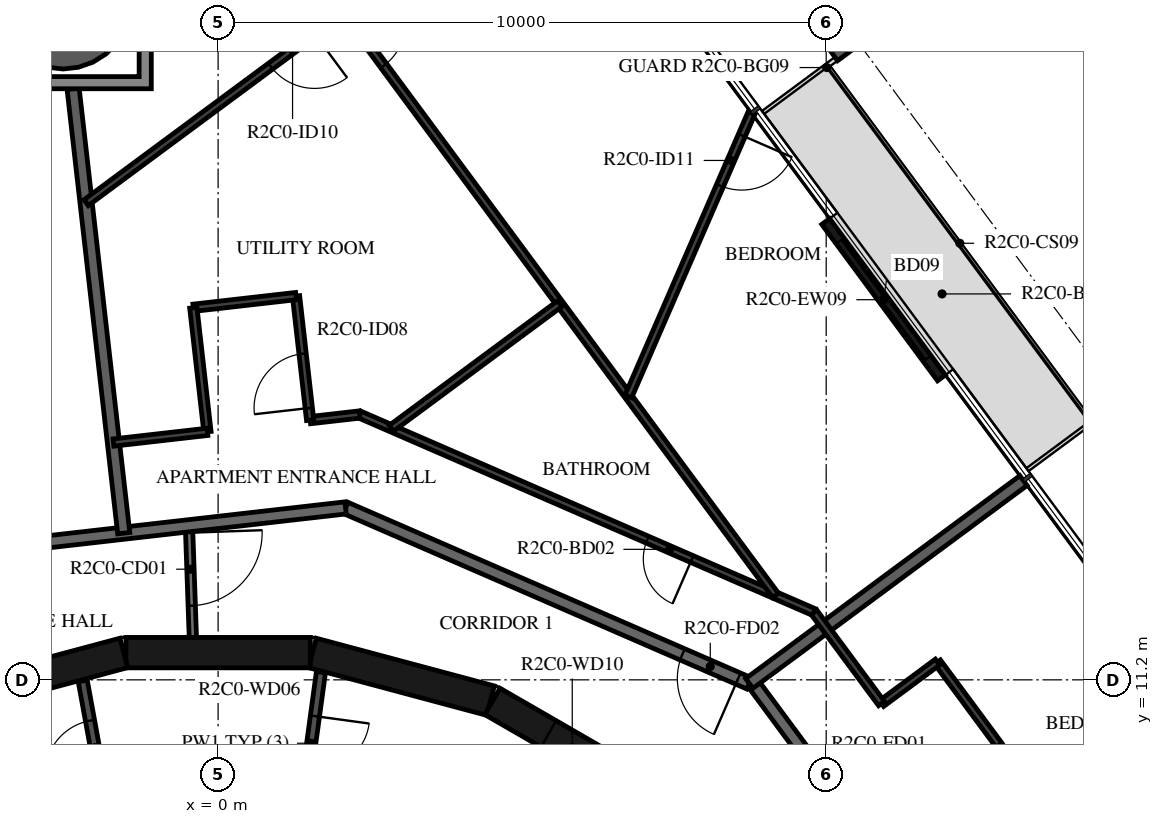
"""IFC4 building model, lengths in metres.
Left out: names, types, materials, properties, quantities, classifications, styles, units other than length and angle.
Written with IfcOpenShell. Run it as: python <this file> out.ifc"""

import sys

from ifc_helpers import new_model, si_unit, direction, frame, frame_2d, origin, origin_2d, place, context, subcontext, project, spatial, polyline, rectangle, hollow_circle, i_section, outline, extrude, element, fill, save


model = new_model("IFC4")
c1 = context("Model", 3, precision=1e-05, world=origin(), true_north=direction((0.0, 1.0)))
c2 = subcontext(c1, "Body", "Model", "MODEL_VIEW")
j1 = project(units=[si_unit("LENGTHUNIT", "METRE"), si_unit("PLANEANGLEUNIT", "RADIAN")], contexts=[c1])
p1 = place(None, origin())
s1 = spatial("IfcSite", under=j1, at=p1, CompositionType="ELEMENT")
p2 = place(p1, origin())
s2 = spatial("IfcBuilding", under=s1, at=p2, CompositionType="ELEMENT")
p3 = place(p2, frame((0.0, 0.0, 104.7)))
s3 = spatial("IfcBuildingStorey", under=s2, at=p3, CompositionType="ELEMENT", Elevation=104.7)
p4 = place(p3, frame((-2.549, 22.37, -0.38), z_axis=(0.0, 0.0, 1.0), x_axis=(1.0, 0.0, 0.0)))
e1 = element("IfcColumn", 1, at=p4, inside=s3, PredefinedType="COLUMN", context=c2, shape_type="SweptSolid", body=[
    extrude(hollow_circle(Radius=1.125, WallThickness=0.055, at=origin_2d()), origin(), (0.0, 0.0, 1.0), 2.576),
])
p5 = place(p3, frame((10.46, 21.77, -0.38), z_axis=(0.0, 0.0, 1.0), x_axis=(0.594822857897, -0.803856807972, 0.0)))
e2 = element("IfcColumn", 2, at=p5, inside=s3, PredefinedType="COLUMN", context=c2, shape_type="SweptSolid", body=[
    extrude(i_section(OverallWidth=0.3, OverallDepth=0.9, WebThickness=0.019, FlangeThickness=0.035, FilletRadius=0.03, at=origin_2d()), origin(), (0.0, 0.0, 1.0), 2.616),
])
p6 = place(p3, frame((11.895, 16.165, 0.0), z_axis=(0.0, 0.0, 1.0), x_axis=(-0.594774973163, 0.803892238611, 0.0)))
e3 = element("IfcWall", 3, at=p6, inside=s3, PredefinedType="STANDARD", context=c2, shape_type="SweptSolid", body=[
    extrude(rectangle(XDim=3.2, YDim=0.16, at=frame_2d((1.6, 0.0))), origin(), (0.0, 0.0, 1.0), 3.05),
])
p7 = place(p6, frame((0.4, 0.0, 0.0)))
e4 = element("IfcOpeningElement", 4, at=p7, cuts=e3, PredefinedType="OPENING", context=c2, shape_type="SweptSolid", body=[
    extrude(rectangle(XDim=2.4, YDim=2.4, at=frame_2d((1.2, 1.2))), frame((0.0, 0.09, 0.0), z_axis=(0.0, -1.0, 0.0), x_axis=(1.0, 0.0, 0.0)), (0.0, 0.0, 1.0), 0.18),
])
p8 = place(p3, frame((7.137, 9.329, 0.0), z_axis=(0.0, 0.0, 1.0), x_axis=(-0.865975092491, 0.500087131594, 0.0)))
e5 = element("IfcWall", 5, at=p8, inside=s3, PredefinedType="SHEAR", context=c2, shape_type="SweptSolid", body=[
    extrude(rectangle(XDim=3.033, YDim=0.5, at=frame_2d((1.516, 0.0))), origin(), (0.0, 0.0, 1.0), 3.05),
])
p9 = place(p8, frame((1.066, 0.0, 0.0)))
e6 = element("IfcOpeningElement", 6, at=p9, cuts=e5, PredefinedType="OPENING", context=c2, shape_type="SweptSolid", body=[
    extrude(rectangle(XDim=0.9, YDim=2.1, at=frame_2d((0.45, 1.05))), frame((0.0, 0.26, 0.0), z_axis=(0.0, -1.0, 0.0), x_axis=(1.0, 0.0, 0.0)), (0.0, 0.0, 1.0), 0.52),
])
for number, where, z_axis, x_axis in (
    (7, (4.479, 10.858, 0.0), (0.0, 0.0, 1.0), (-0.966, 0.259, 0.0)),
    (8, (1.516, 11.647, 0.0), (0.0, 0.0, 1.0), (-1.0, 0.0, 0.0)),
    (9, (-1.55, 11.643, 0.0), (0.0, 0.0, 1.0), (-0.966, -0.259, 0.0)),
):
    element("IfcWall", number, at=place(p3, frame(where, z_axis=z_axis, x_axis=x_axis)), inside=s3, PredefinedType="SHEAR", context=c2, shape_type="SweptSolid", body=[
        extrude(rectangle(XDim=3.033, YDim=0.5, at=frame_2d((1.516, 0.0))), origin(), (0.0, 0.0, 1.0), 3.05),
    ])
p10 = place(p3, frame((1.691, 11.326, 0.0), z_axis=(0.0, 0.0, 1.0), x_axis=(-0.135344253201, -0.990798633994, 0.0)))
e10 = element("IfcWall", 10, at=p10, inside=s3, PredefinedType="PARTITIONING", context=c2, shape_type="SweptSolid", body=[
    extrude(rectangle(XDim=2.358, YDim=0.15, at=frame_2d((1.179, 0.0))), origin(), (0.0, 0.0, 1.0), 3.05),
])
p11 = place(p10, frame((0.729, 0.0, 0.0)))
e11 = element("IfcOpeningElement", 11, at=p11, cuts=e10, PredefinedType="OPENING", context=c2, shape_type="SweptSolid", body=[
    extrude(rectangle(XDim=0.9, YDim=2.1, at=frame_2d((0.45, 1.05))), frame((0.0, 0.085, 0.0), z_axis=(0.0, -1.0, 0.0), x_axis=(1.0, 0.0, 0.0)), (0.0, 0.0, 1.0), 0.17),
])
p12 = place(p3, frame((-1.825, 8.99, 0.0), z_axis=(0.0, 0.0, 1.0), x_axis=(-0.179955206115, 0.983674805915, 0.0)))
e12 = element("IfcWall", 12, at=p12, inside=s3, PredefinedType="PARTITIONING", context=c2, shape_type="SweptSolid", body=[
    extrude(rectangle(XDim=2.229, YDim=0.15, at=frame_2d((1.115, 0.0))), origin(), (0.0, 0.0, 1.0), 3.05),
])
p13 = place(p12, frame((0.665, 0.0, 0.0)))
e13 = element("IfcOpeningElement", 13, at=p13, cuts=e12, PredefinedType="OPENING", context=c2, shape_type="SweptSolid", body=[
    extrude(rectangle(XDim=0.9, YDim=2.1, at=frame_2d((0.45, 1.05))), frame((0.0, 0.085, 0.0), z_axis=(0.0, -1.0, 0.0), x_axis=(1.0, 0.0, 0.0)), (0.0, 0.0, 1.0), 0.17),
])
p14 = place(p3, frame((-0.479, 13.734, 0.0), z_axis=(0.0, 0.0, 1.0), x_axis=(0.034805430832, -0.999394107439, 0.0)))
e14 = element("IfcWall", 14, at=p14, inside=s3, PredefinedType="PARTITIONING", context=c2, shape_type="SweptSolid", body=[
    extrude(rectangle(XDim=1.838, YDim=0.12, at=frame_2d((0.919, 0.0))), origin(), (0.0, 0.0, 1.0), 3.05),
])
p15 = place(p14, frame((0.115, 0.0, 0.0)))
e15 = element("IfcOpeningElement", 15, at=p15, cuts=e14, PredefinedType="OPENING", context=c2, shape_type="SweptSolid", body=[
    extrude(rectangle(XDim=1.2, YDim=2.1, at=frame_2d((0.6, 1.05))), frame((0.0, 0.07, 0.0), z_axis=(0.0, -1.0, 0.0), x_axis=(1.0, 0.0, 0.0)), (0.0, 0.0, 1.0), 0.14),
])
p16 = place(p3, frame((13.196, 5.198, 0.0), z_axis=(0.0, 0.0, 1.0), x_axis=(-0.594805187394, 0.803869883159, 0.0)))
e16 = element("IfcWall", 16, at=p16, inside=s3, PredefinedType="STANDARD", context=c2, shape_type="SweptSolid", body=[
    extrude(rectangle(XDim=7.342, YDim=0.2, at=frame_2d((3.671, 0.0))), origin(), (0.0, 0.0, 1.0), 3.05),
])
p17 = place(p16, frame((4.7, 0.0, 0.0)))
e17 = element("IfcOpeningElement", 17, at=p17, cuts=e16, PredefinedType="OPENING", context=c2, shape_type="SweptSolid", body=[
    extrude(rectangle(XDim=1.0, YDim=2.1, at=frame_2d((0.5, 1.05))), frame((0.0, 0.11, 0.0), z_axis=(0.0, -1.0, 0.0), x_axis=(1.0, 0.0, 0.0)), (0.0, 0.0, 1.0), 0.22),
])
p18 = place(p3, frame((8.736, 11.141, 0.0), z_axis=(0.0, 0.0, 1.0), x_axis=(-0.917051290697, 0.398769269416, 0.0)))
e18 = element("IfcWall", 18, at=p18, inside=s3, PredefinedType="STANDARD", context=c2, shape_type="SweptSolid", body=[
    extrude(rectangle(XDim=7.24, YDim=0.2, at=frame_2d((3.62, 0.0))), origin(), (0.0, 0.0, 1.0), 3.05),
])
p19 = place(p18, frame((0.2, 0.0, 0.0)))
e19 = element("IfcOpeningElement", 19, at=p19, cuts=e18, PredefinedType="OPENING", context=c2, shape_type="SweptSolid", body=[
    extrude(rectangle(XDim=1.0, YDim=2.1, at=frame_2d((0.5, 1.05))), frame((0.0, 0.11, 0.0), z_axis=(0.0, -1.0, 0.0), x_axis=(1.0, 0.0, 0.0)), (0.0, 0.0, 1.0), 0.22),
])
p20 = place(p3, frame((2.096, 14.028, 0.0), z_axis=(0.0, 0.0, 1.0), x_axis=(-0.993569170114, -0.113226782163, 0.0)))
e20 = element("IfcWall", 20, at=p20, inside=s3, PredefinedType="STANDARD", context=c2, shape_type="SweptSolid", body=[
    extrude(rectangle(XDim=7.342, YDim=0.2, at=frame_2d((3.671, 0.0))), origin(), (0.0, 0.0, 1.0), 3.05),
])
p21 = place(p3, frame((13.244, 14.477, 0.0), z_axis=(0.0, 0.0, 1.0), x_axis=(-0.803853971109, -0.594826691677, 0.0)))
e21 = element("IfcWall", 21, at=p21, inside=s3, PredefinedType="STANDARD", context=c2, shape_type="SweptSolid", body=[
    extrude(rectangle(XDim=5.609, YDim=0.2, at=frame_2d((2.804, 0.0))), origin(), (0.0, 0.0, 1.0), 3.05),
])
p22 = place(p3, frame((-2.385, 20.92, 0.0), z_axis=(0.0, 0.0, 1.0), x_axis=(0.113177776247, -0.993574753586, 0.0)))
e22 = element("IfcWall", 22, at=p22, inside=s3, PredefinedType="STANDARD", context=c2, shape_type="SweptSolid", body=[
    extrude(rectangle(XDim=7.356, YDim=0.2, at=frame_2d((3.678, 0.0))), origin(), (0.0, 0.0, 1.0), 3.05),
])
p23 = place(p3, frame((11.921, 9.444, 0.0), z_axis=(0.0, 0.0, 1.0), x_axis=(0.803768532163, 0.594942137274, 0.0)))
e23 = element("IfcWall", 23, at=p23, inside=s3, PredefinedType="PARTITIONING", context=c2, shape_type="SweptSolid", body=[
    extrude(rectangle(XDim=1.146, YDim=0.12, at=frame_2d((0.573, 0.0))), origin(), (0.0, 0.0, 1.0), 3.05),
])
p24 = place(p3, frame((12.842, 10.125, 0.0), z_axis=(0.0, 0.0, 1.0), x_axis=(-0.594770612735, 0.803895464738, 0.0)))
e24 = element("IfcWall", 24, at=p24, inside=s3, PredefinedType="PARTITIONING", context=c2, shape_type="SweptSolid", body=[
    extrude(rectangle(XDim=1.7, YDim=0.12, at=frame_2d((0.85, 0.0))), origin(), (0.0, 0.0, 1.0), 3.05),
])
p25 = place(p3, frame((11.831, 11.492, 0.0), z_axis=(0.0, 0.0, 1.0), x_axis=(-0.803843936653, -0.59484025209, 0.0)))
e25 = element("IfcWall", 25, at=p25, inside=s3, PredefinedType="PARTITIONING", context=c2, shape_type="SweptSolid", body=[
    extrude(rectangle(XDim=1.146, YDim=0.12, at=frame_2d((0.573, 0.0))), origin(), (0.0, 0.0, 1.0), 3.05),
])
p26 = place(p3, frame((10.91, 10.81, 0.0), z_axis=(0.0, 0.0, 1.0), x_axis=(-0.59489693125, 0.803801991282, 0.0)))
e26 = element("IfcWall", 26, at=p26, inside=s3, PredefinedType="PARTITIONING", context=c2, shape_type="SweptSolid", body=[
    extrude(rectangle(XDim=1.872, YDim=0.12, at=frame_2d((0.936, 0.0))), origin(), (0.0, 0.0, 1.0), 3.05),
])
p27 = place(p3, frame((9.796, 12.315, 0.0), z_axis=(0.0, 0.0, 1.0), x_axis=(-0.917059572812, 0.398750222463, 0.0)))
e27 = element("IfcWall", 27, at=p27, inside=s3, PredefinedType="PARTITIONING", context=c2, shape_type="SweptSolid", body=[
    extrude(rectangle(XDim=8.146, YDim=0.12, at=frame_2d((4.073, 0.0))), origin(), (0.0, 0.0, 1.0), 3.05),
])
p28 = place(p27, frame((2.185, 0.0, 0.0)))
e28 = element("IfcOpeningElement", 28, at=p28, cuts=e27, PredefinedType="OPENING", context=c2, shape_type="SweptSolid", body=[
    extrude(rectangle(XDim=0.8, YDim=2.1, at=frame_2d((0.4, 1.05))), frame((0.0, 0.07, 0.0), z_axis=(0.0, -1.0, 0.0), x_axis=(1.0, 0.0, 0.0)), (0.0, 0.0, 1.0), 0.14),
])
p29 = place(p3, frame((2.326, 15.563, 0.0), z_axis=(0.0, 0.0, 1.0), x_axis=(-0.993570169982, -0.113218007944, 0.0)))
e29 = element("IfcWall", 29, at=p29, inside=s3, PredefinedType="PARTITIONING", context=c2, shape_type="SweptSolid", body=[
    extrude(rectangle(XDim=0.817, YDim=0.12, at=frame_2d((0.409, 0.0))), origin(), (0.0, 0.0, 1.0), 3.05),
])
p30 = place(p3, frame((1.514, 15.471, 0.0), z_axis=(0.0, 0.0, 1.0), x_axis=(-0.113301814952, 0.993560616535, 0.0)))
e30 = element("IfcWall", 30, at=p30, inside=s3, PredefinedType="PARTITIONING", context=c2, shape_type="SweptSolid", body=[
    extrude(rectangle(XDim=2.053, YDim=0.12, at=frame_2d((1.027, 0.0))), origin(), (0.0, 0.0, 1.0), 3.05),
])
p31 = place(p30, frame((0.2, 0.0, 0.0)))
e31 = element("IfcOpeningElement", 31, at=p31, cuts=e30, PredefinedType="OPENING", context=c2, shape_type="SweptSolid", body=[
    extrude(rectangle(XDim=0.9, YDim=2.1, at=frame_2d((0.45, 1.05))), frame((0.0, 0.07, 0.0), z_axis=(0.0, -1.0, 0.0), x_axis=(1.0, 0.0, 0.0)), (0.0, 0.0, 1.0), 0.14),
])
p32 = place(p3, frame((1.281, 17.511, 0.0), z_axis=(0.0, 0.0, 1.0), x_axis=(-0.993575191649, -0.113173930474, 0.0)))
e32 = element("IfcWall", 32, at=p32, inside=s3, PredefinedType="PARTITIONING", context=c2, shape_type="SweptSolid", body=[
    extrude(rectangle(XDim=1.7, YDim=0.12, at=frame_2d((0.85, 0.0))), origin(), (0.0, 0.0, 1.0), 3.05),
])
p33 = place(p3, frame((-0.408, 17.319, 0.0), z_axis=(0.0, 0.0, 1.0), x_axis=(0.113184449176, -0.993573993452, 0.0)))
e33 = element("IfcWall", 33, at=p33, inside=s3, PredefinedType="PARTITIONING", context=c2, shape_type="SweptSolid", body=[
    extrude(rectangle(XDim=2.053, YDim=0.12, at=frame_2d((1.027, 0.0))), origin(), (0.0, 0.0, 1.0), 3.05),
])
p34 = place(p3, frame((-0.175, 15.278, 0.0), z_axis=(0.0, 0.0, 1.0), x_axis=(-0.993575604955, -0.113170301923, 0.0)))
e34 = element("IfcWall", 34, at=p34, inside=s3, PredefinedType="PARTITIONING", context=c2, shape_type="SweptSolid", body=[
    extrude(rectangle(XDim=1.555, YDim=0.12, at=frame_2d((0.778, 0.0))), origin(), (0.0, 0.0, 1.0), 3.05),
])
p35 = place(p3, frame((0.498, 24.306, 0.0), z_axis=(0.0, 0.0, 1.0), x_axis=(0.594826122019, -0.803854392639, 0.0)))
e35 = element("IfcWall", 35, at=p35, inside=s3, PredefinedType="PARTITIONING", context=c2, shape_type="SweptSolid", body=[
    extrude(rectangle(XDim=14.576, YDim=0.12, at=frame_2d((7.288, 0.0))), origin(), (0.0, 0.0, 1.0), 3.05),
])
p36 = place(p35, frame((2.841, 0.0, 0.0)))
e36 = element("IfcOpeningElement", 36, at=p36, cuts=e35, PredefinedType="OPENING", context=c2, shape_type="SweptSolid", body=[
    extrude(rectangle(XDim=0.9, YDim=2.1, at=frame_2d((0.45, 1.05))), frame((0.0, 0.07, 0.0), z_axis=(0.0, -1.0, 0.0), x_axis=(1.0, 0.0, 0.0)), (0.0, 0.0, 1.0), 0.14),
])
p37 = place(p35, frame((0.605, 0.0, 0.0)))
e37 = element("IfcOpeningElement", 37, at=p37, cuts=e35, PredefinedType="OPENING", context=c2, shape_type="SweptSolid", body=[
    extrude(rectangle(XDim=0.9, YDim=2.1, at=frame_2d((0.45, 1.05))), frame((0.0, 0.07, 0.0), z_axis=(0.0, -1.0, 0.0), x_axis=(1.0, 0.0, 0.0)), (0.0, 0.0, 1.0), 0.14),
])
p38 = place(p3, frame((8.772, 20.521, 0.0), z_axis=(0.0, 0.0, 1.0), x_axis=(-0.398733139635, -0.917067000473, 0.0)))
e38 = element("IfcWall", 38, at=p38, inside=s3, PredefinedType="PARTITIONING", context=c2, shape_type="SweptSolid", body=[
    extrude(rectangle(XDim=5.081, YDim=0.12, at=frame_2d((2.541, 0.0))), origin(), (0.0, 0.0, 1.0), 3.05),
])
p39 = place(p38, frame((0.4, 0.0, 0.0)))
e39 = element("IfcOpeningElement", 39, at=p39, cuts=e38, PredefinedType="OPENING", context=c2, shape_type="SweptSolid", body=[
    extrude(rectangle(XDim=0.9, YDim=2.1, at=frame_2d((0.45, 1.05))), frame((0.0, 0.07, 0.0), z_axis=(0.0, -1.0, 0.0), x_axis=(1.0, 0.0, 0.0)), (0.0, 0.0, 1.0), 0.14),
])
p40 = place(p3, frame((5.618, 17.386, 0.0), z_axis=(0.0, 0.0, 1.0), x_axis=(-0.803852063114, -0.59482927015, 0.0)))
e40 = element("IfcWall", 40, at=p40, inside=s3, PredefinedType="PARTITIONING", context=c2, shape_type="SweptSolid", body=[
    extrude(rectangle(XDim=3.446, YDim=0.12, at=frame_2d((1.723, 0.0))), origin(), (0.0, 0.0, 1.0), 3.05),
])
p41 = place(p3, frame((2.068, 22.183, 0.0), z_axis=(0.0, 0.0, 1.0), x_axis=(-0.803867138365, -0.594808896921, 0.0)))
e41 = element("IfcWall", 41, at=p41, inside=s3, PredefinedType="PARTITIONING", context=c2, shape_type="SweptSolid", body=[
    extrude(rectangle(XDim=5.273, YDim=0.12, at=frame_2d((2.636, 0.0))), origin(), (0.0, 0.0, 1.0), 3.05),
])
p42 = place(p41, frame((0.6, 0.0, 0.0)))
e42 = element("IfcOpeningElement", 42, at=p42, cuts=e41, PredefinedType="OPENING", context=c2, shape_type="SweptSolid", body=[
    extrude(rectangle(XDim=0.9, YDim=2.1, at=frame_2d((0.45, 1.05))), frame((0.0, 0.07, 0.0), z_axis=(0.0, -1.0, 0.0), x_axis=(1.0, 0.0, 0.0)), (0.0, 0.0, 1.0), 0.14),
])
p43 = place(p3, origin())
e43 = element("IfcWall", 43, at=p43, inside=s3, PredefinedType="STANDARD", context=c2, shape_type="SweptSolid", body=[
    extrude(outline(polyline([(-1.099, 23.82), (-1.099, 20.92), (-3.999, 20.92), (-3.999, 23.82), (-1.099, 23.82)]), holes=[polyline([(-3.799, 21.12), (-1.299, 21.12), (-1.299, 23.62), (-3.799, 23.62), (-3.799, 21.12)])]), origin(), (0.0, 0.0, 1.0), 3.05),
])
p44 = place(p7, origin())
e44 = element("IfcDoor", 44, at=p44, inside=s3, OperationType="DOUBLE_DOOR_SLIDING", PredefinedType="DOOR", context=c2, shape_type="SweptSolid", body=[
    extrude(rectangle(XDim=2.4, YDim=2.4, at=frame_2d((1.2, 1.2))), frame((0.0, 0.025, 0.0), z_axis=(0.0, -1.0, 0.0), x_axis=(1.0, 0.0, 0.0)), (0.0, 0.0, 1.0), 0.05),
])
fill(e4, e44)
p45 = place(p11, origin())
e45 = element("IfcDoor", 45, at=p45, inside=s3, OperationType="SINGLE_SWING_LEFT", PredefinedType="DOOR", context=c2, shape_type="SweptSolid", body=[
    extrude(rectangle(XDim=0.9, YDim=2.1, at=frame_2d((0.45, 1.05))), frame((0.0, 0.025, 0.0), z_axis=(0.0, -1.0, 0.0), x_axis=(1.0, 0.0, 0.0)), (0.0, 0.0, 1.0), 0.05),
])
fill(e11, e45)
p46 = place(p13, origin())
e46 = element("IfcDoor", 46, at=p46, inside=s3, OperationType="SINGLE_SWING_RIGHT", PredefinedType="DOOR", context=c2, shape_type="SweptSolid", body=[
    extrude(rectangle(XDim=0.9, YDim=2.1, at=frame_2d((0.45, 1.05))), frame((0.0, 0.025, 0.0), z_axis=(0.0, -1.0, 0.0), x_axis=(1.0, 0.0, 0.0)), (0.0, 0.0, 1.0), 0.05),
])
fill(e13, e46)
p47 = place(p9, origin())
e47 = element("IfcDoor", 47, at=p47, inside=s3, OperationType="SINGLE_SWING_LEFT", PredefinedType="DOOR", context=c2, shape_type="SweptSolid", body=[
    extrude(rectangle(XDim=0.9, YDim=2.1, at=frame_2d((0.45, 1.05))), frame((0.0, 0.025, 0.0), z_axis=(0.0, -1.0, 0.0), x_axis=(1.0, 0.0, 0.0)), (0.0, 0.0, 1.0), 0.05),
])
fill(e6, e47)
p48 = place(p19, origin())
e48 = element("IfcDoor", 48, at=p48, inside=s3, OperationType="SINGLE_SWING_RIGHT", PredefinedType="DOOR", context=c2, shape_type="SweptSolid", body=[
    extrude(rectangle(XDim=1.0, YDim=2.1, at=frame_2d((0.5, 1.05))), frame((0.0, 0.025, 0.0), z_axis=(0.0, -1.0, 0.0), x_axis=(1.0, 0.0, 0.0)), (0.0, 0.0, 1.0), 0.05),
])
fill(e19, e48)
p49 = place(p28, origin())
e49 = element("IfcDoor", 49, at=p49, inside=s3, OperationType="SINGLE_SWING_RIGHT", PredefinedType="DOOR", context=c2, shape_type="SweptSolid", body=[
    extrude(rectangle(XDim=0.8, YDim=2.1, at=frame_2d((0.4, 1.05))), frame((0.0, 0.025, 0.0), z_axis=(0.0, -1.0, 0.0), x_axis=(1.0, 0.0, 0.0)), (0.0, 0.0, 1.0), 0.05),
])
fill(e28, e49)
p50 = place(p31, origin())
e50 = element("IfcDoor", 50, at=p50, inside=s3, OperationType="SINGLE_SWING_RIGHT", PredefinedType="DOOR", context=c2, shape_type="SweptSolid", body=[
    extrude(rectangle(XDim=0.9, YDim=2.1, at=frame_2d((0.45, 1.05))), frame((0.0, 0.025, 0.0), z_axis=(0.0, -1.0, 0.0), x_axis=(1.0, 0.0, 0.0)), (0.0, 0.0, 1.0), 0.05),
])
fill(e31, e50)
p51 = place(p36, origin())
e51 = element("IfcDoor", 51, at=p51, inside=s3, OperationType="SINGLE_SWING_RIGHT", PredefinedType="DOOR", context=c2, shape_type="SweptSolid", body=[
    extrude(rectangle(XDim=0.9, YDim=2.1, at=frame_2d((0.45, 1.05))), frame((0.0, 0.025, 0.0), z_axis=(0.0, -1.0, 0.0), x_axis=(1.0, 0.0, 0.0)), (0.0, 0.0, 1.0), 0.05),
])
fill(e36, e51)
p52 = place(p42, origin())
e52 = element("IfcDoor", 52, at=p52, inside=s3, OperationType="SINGLE_SWING_RIGHT", PredefinedType="DOOR", context=c2, shape_type="SweptSolid", body=[
    extrude(rectangle(XDim=0.9, YDim=2.1, at=frame_2d((0.45, 1.05))), frame((0.0, 0.025, 0.0), z_axis=(0.0, -1.0, 0.0), x_axis=(1.0, 0.0, 0.0)), (0.0, 0.0, 1.0), 0.05),
])
fill(e42, e52)
p53 = place(p39, origin())
e53 = element("IfcDoor", 53, at=p53, inside=s3, OperationType="SINGLE_SWING_LEFT", PredefinedType="DOOR", context=c2, shape_type="SweptSolid", body=[
    extrude(rectangle(XDim=0.9, YDim=2.1, at=frame_2d((0.45, 1.05))), frame((0.0, 0.025, 0.0), z_axis=(0.0, -1.0, 0.0), x_axis=(1.0, 0.0, 0.0)), (0.0, 0.0, 1.0), 0.05),
])
fill(e39, e53)
p54 = place(p15, origin())
e54 = element("IfcDoor", 54, at=p54, inside=s3, OperationType="DOUBLE_DOOR_SINGLE_SWING", PredefinedType="DOOR", context=c2, shape_type="SweptSolid", body=[
    extrude(rectangle(XDim=1.2, YDim=2.1, at=frame_2d((0.6, 1.05))), frame((0.0, 0.025, 0.0), z_axis=(0.0, -1.0, 0.0), x_axis=(1.0, 0.0, 0.0)), (0.0, 0.0, 1.0), 0.05),
])
fill(e15, e54)
save(model, sys.argv[1])
